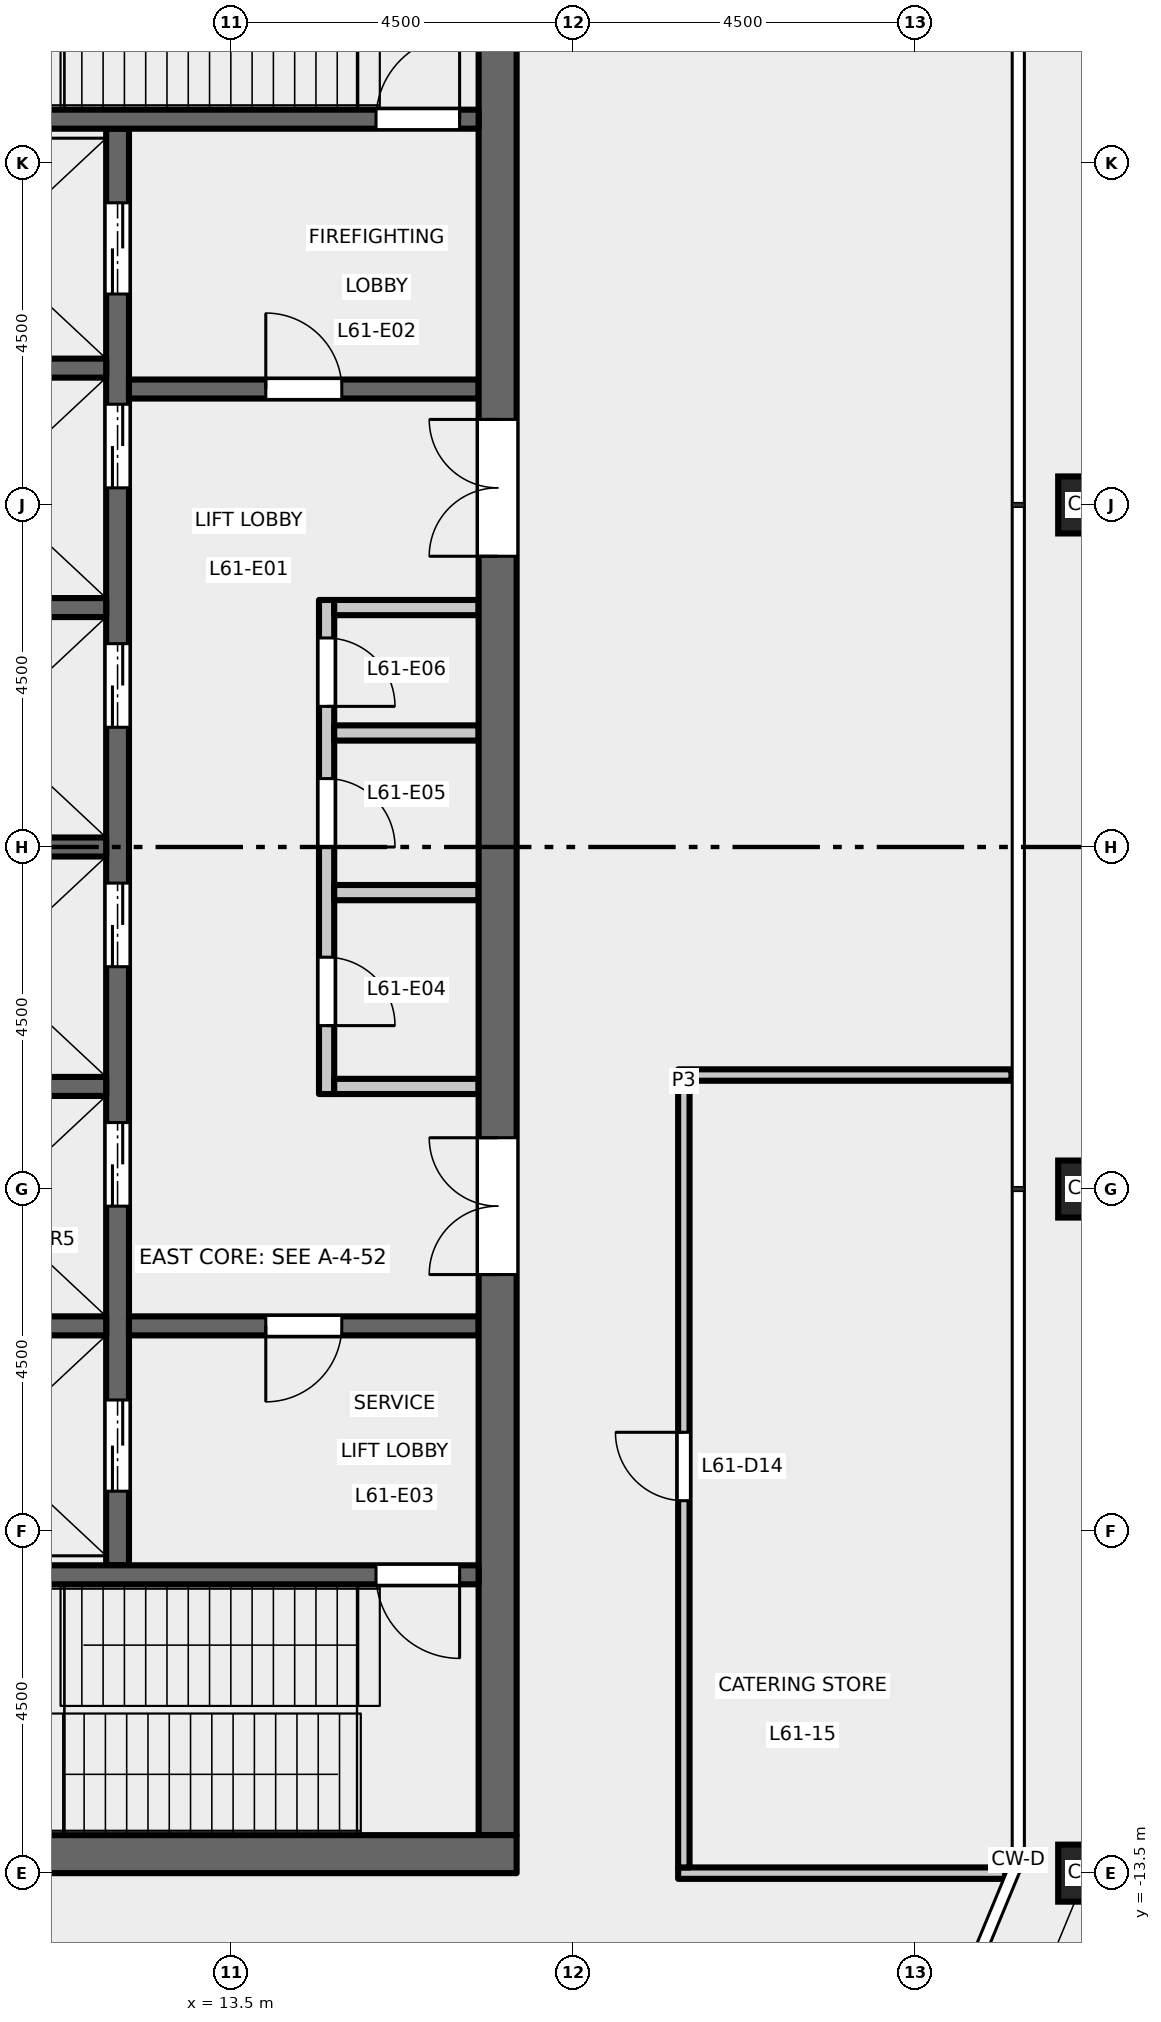
"""IFC4 building model, lengths in metres.
Left out: names, types, materials, properties, quantities, classifications, styles, units other than length and angle.
Written with IfcOpenShell. Run it as: python <this file> out.ifc"""

import sys

from ifc_helpers import new_model, si_unit, direction, frame, frame_2d, origin, origin_2d, place, context, subcontext, project, spatial, rectangle, hollow_rectangle, extrude, element, fill, save


model = new_model("IFC4")
c1 = context("Model", 3, precision=1e-05, world=origin(), true_north=direction((0.0, 1.0)))
c2 = subcontext(c1, "Body", "Model", "MODEL_VIEW")
j1 = project(units=[si_unit("LENGTHUNIT", "METRE"), si_unit("PLANEANGLEUNIT", "RADIAN")], contexts=[c1])
p1 = place(None, origin())
s1 = spatial("IfcSite", under=j1, at=p1, CompositionType="ELEMENT")
p2 = place(p1, origin())
s2 = spatial("IfcBuilding", under=s1, at=p2, CompositionType="ELEMENT")
p3 = place(p2, frame((0.0, 0.0, 284.2)))
s3 = spatial("IfcBuildingStorey", under=s2, at=p3, CompositionType="ELEMENT", Elevation=284.2)
for number, where, z_axis, x_axis in (
    (1, (24.75, -13.5, -0.2), (0.0, 0.0, 1.0), (1.0, 0.0, 0.0)),
    (2, (24.75, -4.5, -0.2), (0.0, 0.0, 1.0), (1.0, 0.0, 0.0)),
    (3, (24.75, 4.5, -0.2), (0.0, 0.0, 1.0), (1.0, 0.0, 0.0)),
):
    element("IfcColumn", number, at=place(p3, frame(where, z_axis=z_axis, x_axis=x_axis)), inside=s3, PredefinedType="COLUMN", context=c2, shape_type="SweptSolid", body=[
        extrude(hollow_rectangle(XDim=0.75, YDim=0.75, WallThickness=0.04, at=origin_2d()), origin(), (0.0, 0.0, 1.0), 5.7),
    ])
p4 = place(p3, frame((14.75, -3.25, 0.0), z_axis=(0.0, 0.0, 1.0), x_axis=(0.0, 1.0, 0.0)))
e4 = element("IfcWall", 4, at=p4, inside=s3, PredefinedType="PARTITIONING", context=c2, shape_type="SweptSolid", body=[
    extrude(rectangle(XDim=6.5, YDim=0.2, at=frame_2d((3.25, 0.0))), origin(), (0.0, 0.0, 1.0), 5.35),
])
p5 = place(p4, frame((0.9, 0.0, 0.0)))
e5 = element("IfcOpeningElement", 5, at=p5, cuts=e4, PredefinedType="OPENING", context=c2, shape_type="SweptSolid", body=[
    extrude(rectangle(XDim=0.9, YDim=2.1, at=frame_2d((0.45, 1.05))), frame((0.0, 0.11, 0.0), z_axis=(0.0, -1.0, 0.0), x_axis=(1.0, 0.0, 0.0)), (0.0, 0.0, 1.0), 0.22),
])
p6 = place(p4, frame((3.25, 0.0, 0.0)))
e6 = element("IfcOpeningElement", 6, at=p6, cuts=e4, PredefinedType="OPENING", context=c2, shape_type="SweptSolid", body=[
    extrude(rectangle(XDim=0.9, YDim=2.1, at=frame_2d((0.45, 1.05))), frame((0.0, 0.11, 0.0), z_axis=(0.0, -1.0, 0.0), x_axis=(1.0, 0.0, 0.0)), (0.0, 0.0, 1.0), 0.22),
])
p7 = place(p4, frame((5.1, 0.0, 0.0)))
e7 = element("IfcOpeningElement", 7, at=p7, cuts=e4, PredefinedType="OPENING", context=c2, shape_type="SweptSolid", body=[
    extrude(rectangle(XDim=0.9, YDim=2.1, at=frame_2d((0.45, 1.05))), frame((0.0, 0.11, 0.0), z_axis=(0.0, -1.0, 0.0), x_axis=(1.0, 0.0, 0.0)), (0.0, 0.0, 1.0), 0.22),
])
for number, where, z_axis, x_axis in (
    (8, (14.85, 3.15, 0.0), (0.0, 0.0, 1.0), (1.0, 0.0, 0.0)),
    (9, (14.85, -3.15, 0.0), (0.0, 0.0, 1.0), (1.0, 0.0, 0.0)),
    (10, (14.85, -0.6, 0.0), (0.0, 0.0, 1.0), (1.0, 0.0, 0.0)),
    (11, (14.85, 1.5, 0.0), (0.0, 0.0, 1.0), (1.0, 0.0, 0.0)),
):
    element("IfcWall", number, at=place(p3, frame(where, z_axis=z_axis, x_axis=x_axis)), inside=s3, PredefinedType="PARTITIONING", context=c2, shape_type="SweptSolid", body=[
        extrude(rectangle(XDim=1.9, YDim=0.2, at=frame_2d((0.95, 0.0))), origin(), (0.0, 0.0, 1.0), 5.35),
    ])
p8 = place(p3, frame((12.0, -9.45, 0.0), z_axis=(0.0, 0.0, 1.0), x_axis=(0.0, 1.0, 0.0)))
e12 = element("IfcWall", 12, at=p8, inside=s3, PredefinedType="SHEAR", context=c2, shape_type="SweptSolid", body=[
    extrude(rectangle(XDim=18.9, YDim=0.3, at=frame_2d((9.45, 0.0))), origin(), (0.0, 0.0, 1.0), 5.35),
])
p9 = place(p8, frame((4.725, 0.0, 0.0)))
e13 = element("IfcOpeningElement", 13, at=p9, cuts=e12, PredefinedType="OPENING", context=c2, shape_type="SweptSolid", body=[
    extrude(rectangle(XDim=1.1, YDim=2.1, at=frame_2d((0.55, 1.05))), frame((0.0, 0.16, 0.0), z_axis=(0.0, -1.0, 0.0), x_axis=(1.0, 0.0, 0.0)), (0.0, 0.0, 1.0), 0.32),
])
p10 = place(p8, frame((7.875, 0.0, 0.0)))
e14 = element("IfcOpeningElement", 14, at=p10, cuts=e12, PredefinedType="OPENING", context=c2, shape_type="SweptSolid", body=[
    extrude(rectangle(XDim=1.1, YDim=2.1, at=frame_2d((0.55, 1.05))), frame((0.0, 0.16, 0.0), z_axis=(0.0, -1.0, 0.0), x_axis=(1.0, 0.0, 0.0)), (0.0, 0.0, 1.0), 0.32),
])
p11 = place(p8, frame((11.025, 0.0, 0.0)))
e15 = element("IfcOpeningElement", 15, at=p11, cuts=e12, PredefinedType="OPENING", context=c2, shape_type="SweptSolid", body=[
    extrude(rectangle(XDim=1.1, YDim=2.1, at=frame_2d((0.55, 1.05))), frame((0.0, 0.16, 0.0), z_axis=(0.0, -1.0, 0.0), x_axis=(1.0, 0.0, 0.0)), (0.0, 0.0, 1.0), 0.32),
])
p12 = place(p8, frame((14.175, 0.0, 0.0)))
e16 = element("IfcOpeningElement", 16, at=p12, cuts=e12, PredefinedType="OPENING", context=c2, shape_type="SweptSolid", body=[
    extrude(rectangle(XDim=1.1, YDim=2.1, at=frame_2d((0.55, 1.05))), frame((0.0, 0.16, 0.0), z_axis=(0.0, -1.0, 0.0), x_axis=(1.0, 0.0, 0.0)), (0.0, 0.0, 1.0), 0.32),
])
p13 = place(p8, frame((16.725, 0.0, 0.0)))
e17 = element("IfcOpeningElement", 17, at=p13, cuts=e12, PredefinedType="OPENING", context=c2, shape_type="SweptSolid", body=[
    extrude(rectangle(XDim=1.2, YDim=2.1, at=frame_2d((0.6, 1.05))), frame((0.0, 0.16, 0.0), z_axis=(0.0, -1.0, 0.0), x_axis=(1.0, 0.0, 0.0)), (0.0, 0.0, 1.0), 0.32),
])
p14 = place(p8, frame((0.975, 0.0, 0.0)))
e18 = element("IfcOpeningElement", 18, at=p14, cuts=e12, PredefinedType="OPENING", context=c2, shape_type="SweptSolid", body=[
    extrude(rectangle(XDim=1.2, YDim=2.1, at=frame_2d((0.6, 1.05))), frame((0.0, 0.16, 0.0), z_axis=(0.0, -1.0, 0.0), x_axis=(1.0, 0.0, 0.0)), (0.0, 0.0, 1.0), 0.32),
])
p15 = place(p3, frame((12.15, 6.025, 0.0), z_axis=(0.0, 0.0, 1.0), x_axis=(1.0, 0.0, 0.0)))
e19 = element("IfcWall", 19, at=p15, inside=s3, PredefinedType="SHEAR", context=c2, shape_type="SweptSolid", body=[
    extrude(rectangle(XDim=4.6, YDim=0.25, at=frame_2d((2.3, 0.0))), origin(), (0.0, 0.0, 1.0), 5.35),
])
p16 = place(p15, frame((1.8, 0.0, 0.0)))
e20 = element("IfcOpeningElement", 20, at=p16, cuts=e19, PredefinedType="OPENING", context=c2, shape_type="SweptSolid", body=[
    extrude(rectangle(XDim=1.0, YDim=2.1, at=frame_2d((0.5, 1.05))), frame((0.0, 0.135, 0.0), z_axis=(0.0, -1.0, 0.0), x_axis=(1.0, 0.0, 0.0)), (0.0, 0.0, 1.0), 0.27),
])
p17 = place(p3, frame((12.15, -6.3, 0.0), z_axis=(0.0, 0.0, 1.0), x_axis=(1.0, 0.0, 0.0)))
e21 = element("IfcWall", 21, at=p17, inside=s3, PredefinedType="SHEAR", context=c2, shape_type="SweptSolid", body=[
    extrude(rectangle(XDim=4.6, YDim=0.25, at=frame_2d((2.3, 0.0))), origin(), (0.0, 0.0, 1.0), 5.35),
])
p18 = place(p17, frame((1.8, 0.0, 0.0)))
e22 = element("IfcOpeningElement", 22, at=p18, cuts=e21, PredefinedType="OPENING", context=c2, shape_type="SweptSolid", body=[
    extrude(rectangle(XDim=1.0, YDim=2.1, at=frame_2d((0.5, 1.05))), frame((0.0, 0.135, 0.0), z_axis=(0.0, -1.0, 0.0), x_axis=(1.0, 0.0, 0.0)), (0.0, 0.0, 1.0), 0.27),
])
p19 = place(p3, frame((17.0, -13.0, 0.0), z_axis=(0.0, 0.0, 1.0), x_axis=(0.0, 1.0, 0.0)))
e23 = element("IfcWall", 23, at=p19, inside=s3, PredefinedType="SHEAR", context=c2, shape_type="SweptSolid", body=[
    extrude(rectangle(XDim=26.0, YDim=0.5, at=frame_2d((13.0, 0.0))), origin(), (0.0, 0.0, 1.0), 5.35),
])
p20 = place(p19, frame((16.825, 0.0, 0.0)))
e24 = element("IfcOpeningElement", 24, at=p20, cuts=e23, PredefinedType="OPENING", context=c2, shape_type="SweptSolid", body=[
    extrude(rectangle(XDim=1.8, YDim=2.1, at=frame_2d((0.9, 1.05))), frame((0.0, 0.26, 0.0), z_axis=(0.0, -1.0, 0.0), x_axis=(1.0, 0.0, 0.0)), (0.0, 0.0, 1.0), 0.52),
])
p21 = place(p19, frame((7.375, 0.0, 0.0)))
e25 = element("IfcOpeningElement", 25, at=p21, cuts=e23, PredefinedType="OPENING", context=c2, shape_type="SweptSolid", body=[
    extrude(rectangle(XDim=1.8, YDim=2.1, at=frame_2d((0.9, 1.05))), frame((0.0, 0.26, 0.0), z_axis=(0.0, -1.0, 0.0), x_axis=(1.0, 0.0, 0.0)), (0.0, 0.0, 1.0), 0.52),
])
for number, where, z_axis, x_axis in (
    (26, (8.75, 0.0, 0.0), (0.0, 0.0, 1.0), (1.0, 0.0, 0.0)),
    (27, (8.75, 3.15, 0.0), (0.0, 0.0, 1.0), (1.0, 0.0, 0.0)),
    (28, (8.75, 6.3, 0.0), (0.0, 0.0, 1.0), (1.0, 0.0, 0.0)),
    (29, (8.75, -3.15, 0.0), (0.0, 0.0, 1.0), (1.0, 0.0, 0.0)),
    (30, (8.75, -6.3, 0.0), (0.0, 0.0, 1.0), (1.0, 0.0, 0.0)),
):
    element("IfcWall", number, at=place(p3, frame(where, z_axis=z_axis, x_axis=x_axis)), inside=s3, PredefinedType="SHEAR", context=c2, shape_type="SweptSolid", body=[
        extrude(rectangle(XDim=3.1, YDim=0.25, at=frame_2d((1.55, 0.0))), origin(), (0.0, 0.0, 1.0), 5.35),
    ])
p22 = place(p3, frame((8.75, 9.575, 0.0), z_axis=(0.0, 0.0, 1.0), x_axis=(1.0, 0.0, 0.0)))
e31 = element("IfcWall", 31, at=p22, inside=s3, PredefinedType="SHEAR", context=c2, shape_type="SweptSolid", body=[
    extrude(rectangle(XDim=8.0, YDim=0.25, at=frame_2d((4.0, 0.0))), origin(), (0.0, 0.0, 1.0), 5.35),
])
p23 = place(p22, frame((6.65, 0.0, 0.0)))
e32 = element("IfcOpeningElement", 32, at=p23, cuts=e31, PredefinedType="OPENING", context=c2, shape_type="SweptSolid", body=[
    extrude(rectangle(XDim=1.1, YDim=2.1, at=frame_2d((0.55, 1.05))), frame((0.0, 0.135, 0.0), z_axis=(0.0, -1.0, 0.0), x_axis=(1.0, 0.0, 0.0)), (0.0, 0.0, 1.0), 0.27),
])
p24 = place(p3, frame((8.75, -9.575, 0.0), z_axis=(0.0, 0.0, 1.0), x_axis=(1.0, 0.0, 0.0)))
e33 = element("IfcWall", 33, at=p24, inside=s3, PredefinedType="SHEAR", context=c2, shape_type="SweptSolid", body=[
    extrude(rectangle(XDim=8.0, YDim=0.25, at=frame_2d((4.0, 0.0))), origin(), (0.0, 0.0, 1.0), 5.35),
])
p25 = place(p24, frame((6.65, 0.0, 0.0)))
e34 = element("IfcOpeningElement", 34, at=p25, cuts=e33, PredefinedType="OPENING", context=c2, shape_type="SweptSolid", body=[
    extrude(rectangle(XDim=1.1, YDim=2.1, at=frame_2d((0.55, 1.05))), frame((0.0, 0.135, 0.0), z_axis=(0.0, -1.0, 0.0), x_axis=(1.0, 0.0, 0.0)), (0.0, 0.0, 1.0), 0.27),
])
p26 = place(p3, frame((8.25, -13.25, 0.0), z_axis=(0.0, 0.0, 1.0), x_axis=(1.0, 0.0, 0.0)))
e35 = element("IfcWall", 35, at=p26, inside=s3, PredefinedType="SHEAR", context=c2, shape_type="SweptSolid", body=[
    extrude(rectangle(XDim=9.0, YDim=0.5, at=frame_2d((4.5, 0.0))), origin(), (0.0, 0.0, 1.0), 5.35),
])
p27 = place(p3, frame((19.375, -13.5, 0.0), z_axis=(0.0, 0.0, 1.0), x_axis=(1.0, 0.0, 0.0)))
e36 = element("IfcWall", 36, at=p27, inside=s3, PredefinedType="PARTITIONING", context=c2, shape_type="SweptSolid", body=[
    extrude(rectangle(XDim=4.303, YDim=0.15, at=frame_2d((2.151, 0.0))), origin(), (0.0, 0.0, 1.0), 5.35),
])
p28 = place(p3, frame((19.375, -3.0, 0.0), z_axis=(0.0, 0.0, 1.0), x_axis=(1.0, 0.0, 0.0)))
e37 = element("IfcWall", 37, at=p28, inside=s3, PredefinedType="PARTITIONING", context=c2, shape_type="SweptSolid", body=[
    extrude(rectangle(XDim=4.385, YDim=0.15, at=frame_2d((2.192, 0.0))), origin(), (0.0, 0.0, 1.0), 5.35),
])
p29 = place(p3, frame((19.45, -13.425, 0.0), z_axis=(0.0, 0.0, 1.0), x_axis=(0.0, 1.0, 0.0)))
e38 = element("IfcWall", 38, at=p29, inside=s3, PredefinedType="PARTITIONING", context=c2, shape_type="SweptSolid", body=[
    extrude(rectangle(XDim=10.35, YDim=0.15, at=frame_2d((5.175, 0.0))), origin(), (0.0, 0.0, 1.0), 5.35),
])
p30 = place(p29, frame((4.825, 0.0, 0.0)))
e39 = element("IfcOpeningElement", 39, at=p30, cuts=e38, PredefinedType="OPENING", context=c2, shape_type="SweptSolid", body=[
    extrude(rectangle(XDim=0.9, YDim=2.1, at=frame_2d((0.45, 1.05))), frame((0.0, 0.085, 0.0), z_axis=(0.0, -1.0, 0.0), x_axis=(1.0, 0.0, 0.0)), (0.0, 0.0, 1.0), 0.17),
])
p31 = place(p16, origin())
e40 = element("IfcDoor", 40, at=p31, inside=s3, OperationType="SINGLE_SWING_RIGHT", PredefinedType="DOOR", context=c2, shape_type="SweptSolid", body=[
    extrude(rectangle(XDim=1.0, YDim=2.1, at=frame_2d((0.5, 1.05))), frame((0.0, 0.025, 0.0), z_axis=(0.0, -1.0, 0.0), x_axis=(1.0, 0.0, 0.0)), (0.0, 0.0, 1.0), 0.05),
])
fill(e20, e40)
p32 = place(p18, origin())
e41 = element("IfcDoor", 41, at=p32, inside=s3, OperationType="SINGLE_SWING_LEFT", PredefinedType="DOOR", context=c2, shape_type="SweptSolid", body=[
    extrude(rectangle(XDim=1.0, YDim=2.1, at=frame_2d((0.5, 1.05))), frame((0.0, 0.025, 0.0), z_axis=(0.0, -1.0, 0.0), x_axis=(1.0, 0.0, 0.0)), (0.0, 0.0, 1.0), 0.05),
])
fill(e22, e41)
p33 = place(p23, origin())
e42 = element("IfcDoor", 42, at=p33, inside=s3, OperationType="SINGLE_SWING_LEFT", PredefinedType="DOOR", context=c2, shape_type="SweptSolid", body=[
    extrude(rectangle(XDim=1.1, YDim=2.1, at=frame_2d((0.55, 1.05))), frame((0.0, 0.025, 0.0), z_axis=(0.0, -1.0, 0.0), x_axis=(1.0, 0.0, 0.0)), (0.0, 0.0, 1.0), 0.05),
])
fill(e32, e42)
p34 = place(p25, origin())
e43 = element("IfcDoor", 43, at=p34, inside=s3, OperationType="SINGLE_SWING_RIGHT", PredefinedType="DOOR", context=c2, shape_type="SweptSolid", body=[
    extrude(rectangle(XDim=1.1, YDim=2.1, at=frame_2d((0.55, 1.05))), frame((0.0, 0.025, 0.0), z_axis=(0.0, -1.0, 0.0), x_axis=(1.0, 0.0, 0.0)), (0.0, 0.0, 1.0), 0.05),
])
fill(e34, e43)
p35 = place(p20, origin())
e44 = element("IfcDoor", 44, at=p35, inside=s3, OperationType="DOUBLE_DOOR_DOUBLE_SWING", PredefinedType="DOOR", context=c2, shape_type="SweptSolid", body=[
    extrude(rectangle(XDim=1.8, YDim=2.1, at=frame_2d((0.9, 1.05))), frame((0.0, 0.025, 0.0), z_axis=(0.0, -1.0, 0.0), x_axis=(1.0, 0.0, 0.0)), (0.0, 0.0, 1.0), 0.05),
])
fill(e24, e44)
p36 = place(p21, origin())
e45 = element("IfcDoor", 45, at=p36, inside=s3, OperationType="DOUBLE_DOOR_DOUBLE_SWING", PredefinedType="DOOR", context=c2, shape_type="SweptSolid", body=[
    extrude(rectangle(XDim=1.8, YDim=2.1, at=frame_2d((0.9, 1.05))), frame((0.0, 0.025, 0.0), z_axis=(0.0, -1.0, 0.0), x_axis=(1.0, 0.0, 0.0)), (0.0, 0.0, 1.0), 0.05),
])
fill(e25, e45)
p37 = place(p9, origin())
e46 = element("IfcDoor", 46, at=p37, inside=s3, OperationType="DOUBLE_DOOR_SLIDING", PredefinedType="DOOR", context=c2, shape_type="SweptSolid", body=[
    extrude(rectangle(XDim=1.1, YDim=2.1, at=frame_2d((0.55, 1.05))), frame((0.0, 0.025, 0.0), z_axis=(0.0, -1.0, 0.0), x_axis=(1.0, 0.0, 0.0)), (0.0, 0.0, 1.0), 0.05),
])
fill(e13, e46)
p38 = place(p10, origin())
e47 = element("IfcDoor", 47, at=p38, inside=s3, OperationType="DOUBLE_DOOR_SLIDING", PredefinedType="DOOR", context=c2, shape_type="SweptSolid", body=[
    extrude(rectangle(XDim=1.1, YDim=2.1, at=frame_2d((0.55, 1.05))), frame((0.0, 0.025, 0.0), z_axis=(0.0, -1.0, 0.0), x_axis=(1.0, 0.0, 0.0)), (0.0, 0.0, 1.0), 0.05),
])
fill(e14, e47)
p39 = place(p11, origin())
e48 = element("IfcDoor", 48, at=p39, inside=s3, OperationType="DOUBLE_DOOR_SLIDING", PredefinedType="DOOR", context=c2, shape_type="SweptSolid", body=[
    extrude(rectangle(XDim=1.1, YDim=2.1, at=frame_2d((0.55, 1.05))), frame((0.0, 0.025, 0.0), z_axis=(0.0, -1.0, 0.0), x_axis=(1.0, 0.0, 0.0)), (0.0, 0.0, 1.0), 0.05),
])
fill(e15, e48)
p40 = place(p12, origin())
e49 = element("IfcDoor", 49, at=p40, inside=s3, OperationType="DOUBLE_DOOR_SLIDING", PredefinedType="DOOR", context=c2, shape_type="SweptSolid", body=[
    extrude(rectangle(XDim=1.1, YDim=2.1, at=frame_2d((0.55, 1.05))), frame((0.0, 0.025, 0.0), z_axis=(0.0, -1.0, 0.0), x_axis=(1.0, 0.0, 0.0)), (0.0, 0.0, 1.0), 0.05),
])
fill(e16, e49)
p41 = place(p13, origin())
e50 = element("IfcDoor", 50, at=p41, inside=s3, OperationType="DOUBLE_DOOR_SLIDING", PredefinedType="DOOR", context=c2, shape_type="SweptSolid", body=[
    extrude(rectangle(XDim=1.2, YDim=2.1, at=frame_2d((0.6, 1.05))), frame((0.0, 0.025, 0.0), z_axis=(0.0, -1.0, 0.0), x_axis=(1.0, 0.0, 0.0)), (0.0, 0.0, 1.0), 0.05),
])
fill(e17, e50)
p42 = place(p14, origin())
e51 = element("IfcDoor", 51, at=p42, inside=s3, OperationType="DOUBLE_DOOR_SLIDING", PredefinedType="DOOR", context=c2, shape_type="SweptSolid", body=[
    extrude(rectangle(XDim=1.2, YDim=2.1, at=frame_2d((0.6, 1.05))), frame((0.0, 0.025, 0.0), z_axis=(0.0, -1.0, 0.0), x_axis=(1.0, 0.0, 0.0)), (0.0, 0.0, 1.0), 0.05),
])
fill(e18, e51)
p43 = place(p5, origin())
e52 = element("IfcDoor", 52, at=p43, inside=s3, OperationType="SINGLE_SWING_LEFT", PredefinedType="DOOR", context=c2, shape_type="SweptSolid", body=[
    extrude(rectangle(XDim=0.9, YDim=2.1, at=frame_2d((0.45, 1.05))), frame((0.0, 0.025, 0.0), z_axis=(0.0, -1.0, 0.0), x_axis=(1.0, 0.0, 0.0)), (0.0, 0.0, 1.0), 0.05),
])
fill(e5, e52)
p44 = place(p6, origin())
e53 = element("IfcDoor", 53, at=p44, inside=s3, OperationType="SINGLE_SWING_LEFT", PredefinedType="DOOR", context=c2, shape_type="SweptSolid", body=[
    extrude(rectangle(XDim=0.9, YDim=2.1, at=frame_2d((0.45, 1.05))), frame((0.0, 0.025, 0.0), z_axis=(0.0, -1.0, 0.0), x_axis=(1.0, 0.0, 0.0)), (0.0, 0.0, 1.0), 0.05),
])
fill(e6, e53)
p45 = place(p7, origin())
e54 = element("IfcDoor", 54, at=p45, inside=s3, OperationType="SINGLE_SWING_LEFT", PredefinedType="DOOR", context=c2, shape_type="SweptSolid", body=[
    extrude(rectangle(XDim=0.9, YDim=2.1, at=frame_2d((0.45, 1.05))), frame((0.0, 0.025, 0.0), z_axis=(0.0, -1.0, 0.0), x_axis=(1.0, 0.0, 0.0)), (0.0, 0.0, 1.0), 0.05),
])
fill(e7, e54)
p46 = place(p30, origin())
e55 = element("IfcDoor", 55, at=p46, inside=s3, OperationType="SINGLE_SWING_RIGHT", PredefinedType="DOOR", context=c2, shape_type="SweptSolid", body=[
    extrude(rectangle(XDim=0.9, YDim=2.1, at=frame_2d((0.45, 1.05))), frame((0.0, 0.025, 0.0), z_axis=(0.0, -1.0, 0.0), x_axis=(1.0, 0.0, 0.0)), (0.0, 0.0, 1.0), 0.05),
])
fill(e39, e55)
save(model, sys.argv[1])
